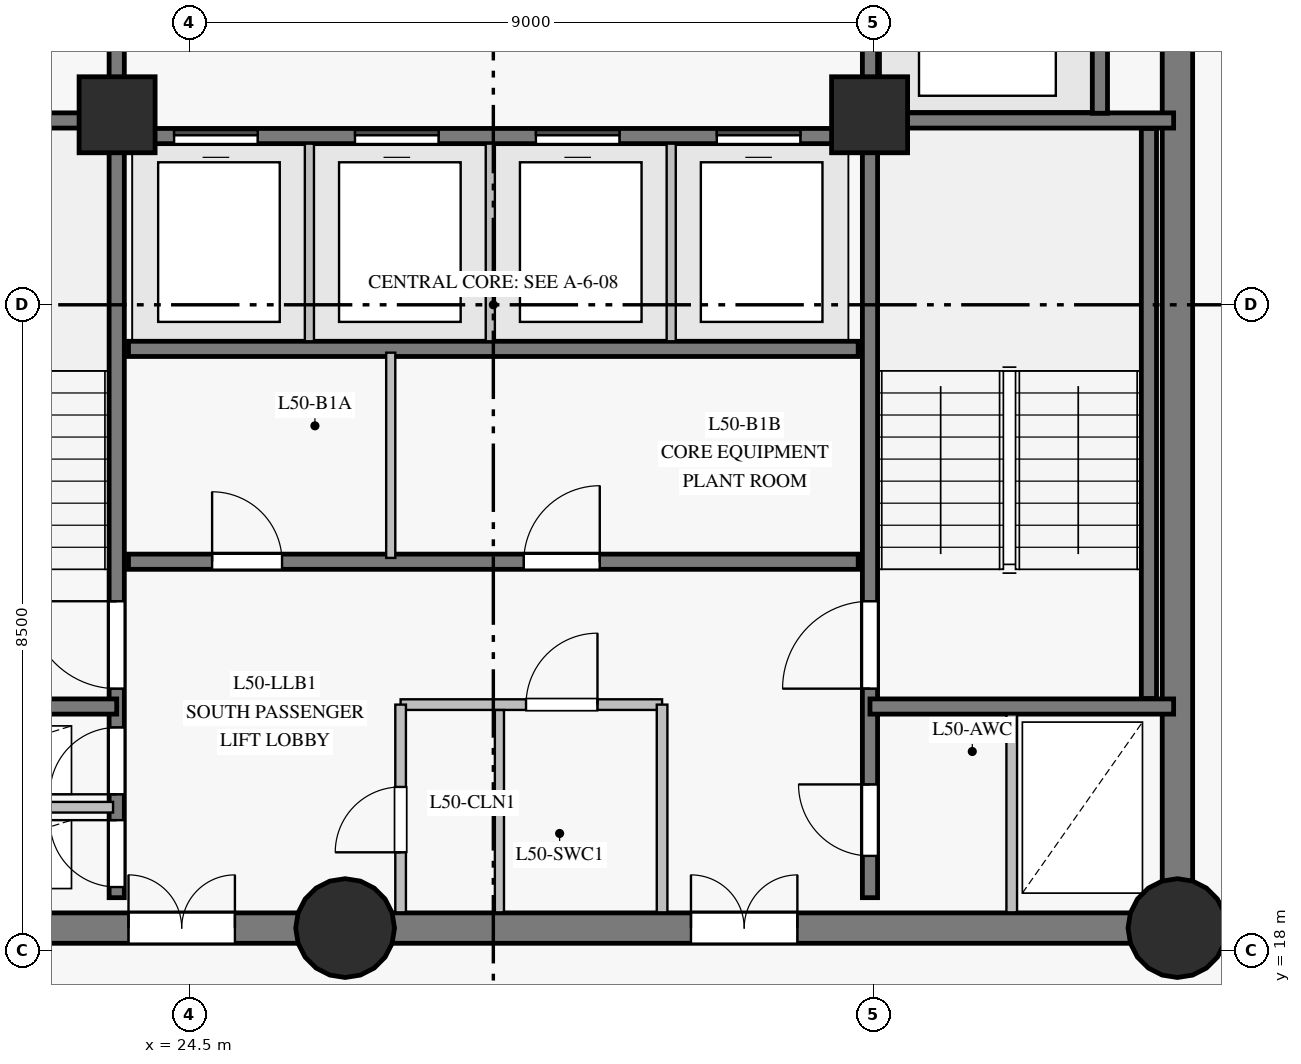
"""IFC4 building model, lengths in metres.
Left out: names, types, materials, properties, quantities, classifications, styles, units other than length and angle.
Written with IfcOpenShell. Run it as: python <this file> out.ifc"""

import sys

from ifc_helpers import new_model, si_unit, direction, frame, frame_2d, origin, origin_with_axes, origin_2d, place, context, subcontext, project, spatial, rectangle, circle, extrude, source, transform, mapped, element, fill, save


model = new_model("IFC4")
c1 = context("Model", 3, precision=1e-05, world=origin(), true_north=direction((0.0, 1.0)))
c2 = subcontext(c1, "Body", "Model", "MODEL_VIEW")
j1 = project(units=[si_unit("LENGTHUNIT", "METRE"), si_unit("PLANEANGLEUNIT", "RADIAN")], contexts=[c1])
p1 = place(None, origin())
s1 = spatial("IfcSite", under=j1, at=p1, CompositionType="ELEMENT")
p2 = place(p1, origin())
s2 = spatial("IfcBuilding", under=s1, at=p2, CompositionType="ELEMENT")
p3 = place(p2, frame((0.0, 0.0, 174.85)))
s3 = spatial("IfcBuildingStorey", under=s2, at=p3, CompositionType="ELEMENT", Elevation=174.85)
p4 = place(p3, frame((19.5, 18.3, 0.0), z_axis=(0.0, 0.0, 1.0), x_axis=(1.0, 0.0, 0.0)))
e1 = element("IfcWall", 1, at=p4, inside=s3, PredefinedType="SHEAR", context=c2, shape_type="SweptSolid", body=[
    extrude(rectangle(XDim=7.05, YDim=0.4, at=frame_2d((3.525, 0.0))), origin(), (0.0, 0.0, 1.0), 2.825),
])
p5 = place(p4, frame((4.2, 0.0, 0.0)))
e2 = element("IfcOpeningElement", 2, at=p5, cuts=e1, PredefinedType="OPENING", context=c2, shape_type="SweptSolid", body=[
    extrude(rectangle(XDim=1.4, YDim=2.2, at=frame_2d((0.7, 1.1))), frame((0.0, 0.21, 0.0), z_axis=(0.0, -1.0, 0.0), x_axis=(1.0, 0.0, 0.0)), (0.0, 0.0, 1.0), 0.42),
])
p6 = place(p3, frame((26.55, 18.3, 0.0), z_axis=(0.0, 0.0, 1.0), x_axis=(1.0, 0.0, 0.0)))
e3 = element("IfcWall", 3, at=p6, inside=s3, PredefinedType="SHEAR", context=c2, shape_type="SweptSolid", body=[
    extrude(rectangle(XDim=10.95, YDim=0.4, at=frame_2d((5.475, 0.0))), origin(), (0.0, 0.0, 1.0), 2.825),
])
p7 = place(p6, frame((4.55, 0.0, 0.0)))
e4 = element("IfcOpeningElement", 4, at=p7, cuts=e3, PredefinedType="OPENING", context=c2, shape_type="SweptSolid", body=[
    extrude(rectangle(XDim=1.4, YDim=2.2, at=frame_2d((0.7, 1.1))), frame((0.0, 0.21, 0.0), z_axis=(0.0, -1.0, 0.0), x_axis=(1.0, 0.0, 0.0)), (0.0, 0.0, 1.0), 0.42),
])
p8 = place(p3, frame((37.5, 18.3, 0.0), z_axis=(0.0, 0.0, 1.0), x_axis=(0.0, 1.0, 0.0)))
e5 = element("IfcWall", 5, at=p8, inside=s3, PredefinedType="SHEAR", context=c2, shape_type="SweptSolid", body=[
    extrude(rectangle(XDim=16.4, YDim=0.4, at=frame_2d((8.2, 0.0))), origin(), (0.0, 0.0, 1.0), 2.825),
])
p9 = place(p8, frame((14.15, 0.0, 0.0)))
e6 = element("IfcOpeningElement", 6, at=p9, cuts=e5, PredefinedType="OPENING", context=c2, shape_type="SweptSolid", body=[
    extrude(rectangle(XDim=1.2, YDim=2.15, at=frame_2d((0.6, 1.075))), frame((0.0, 0.21, 0.0), z_axis=(0.0, -1.0, 0.0), x_axis=(1.0, 0.0, 0.0)), (0.0, 0.0, 1.0), 0.42),
])
m1 = source(origin_with_axes(), c2, "Body", "SweptSolid", [
    extrude(circle(Radius=0.65, at=origin_2d()), origin(), (0.0, 0.0, 1.0), 3.05),
])
for number, where, z_axis, x_axis in (
    (7, (26.55, 18.3, 0.0), (0.0, 0.0, 1.0), (1.0, 0.0, 0.0)),
    (8, (37.5, 18.3, 0.0), (0.0, 0.0, 1.0), (1.0, 0.0, 0.0)),
):
    element("IfcColumn", number, at=place(p3, frame(where, z_axis=z_axis, x_axis=x_axis)), inside=s3, PredefinedType="COLUMN", context=c2, shape_type="MappedRepresentation", body=[
        mapped(m1, transform((0.0, 0.0, 0.0), scale=1.0)),
    ])
m2 = source(origin_with_axes(), c2, "Body", "SweptSolid", [
    extrude(rectangle(XDim=1.0, YDim=1.0, at=origin_2d()), origin(), (0.0, 0.0, 1.0), 3.05),
])
for number, where, z_axis, x_axis in (
    (9, (23.55, 29.0, 0.0), (0.0, 0.0, 1.0), (1.0, 0.0, 0.0)),
    (10, (33.45, 29.0, 0.0), (0.0, 0.0, 1.0), (1.0, 0.0, 0.0)),
):
    element("IfcColumn", number, at=place(p3, frame(where, z_axis=z_axis, x_axis=x_axis)), inside=s3, PredefinedType="COLUMN", context=c2, shape_type="MappedRepresentation", body=[
        mapped(m2, transform((0.0, 0.0, 0.0), scale=1.0)),
    ])
p10 = place(p3, frame((23.545, 18.7, 0.0), z_axis=(0.0, 0.0, 1.0), x_axis=(0.0, 1.0, 0.0)))
e11 = element("IfcWall", 11, at=p10, inside=s3, PredefinedType="SHEAR", context=c2, shape_type="SweptSolid", body=[
    extrude(rectangle(XDim=15.6, YDim=0.2, at=frame_2d((7.8, 0.0))), origin(), (0.0, 0.0, 1.0), 2.825),
])
p11 = place(p10, frame((2.75, 0.0, 0.0)))
e12 = element("IfcOpeningElement", 12, at=p11, cuts=e11, PredefinedType="OPENING", context=c2, shape_type="SweptSolid", body=[
    extrude(rectangle(XDim=1.15, YDim=2.15, at=frame_2d((0.575, 1.075))), frame((0.0, 0.11, 0.0), z_axis=(0.0, -1.0, 0.0), x_axis=(1.0, 0.0, 0.0)), (0.0, 0.0, 1.0), 0.22),
])
p12 = place(p10, frame((0.14, 0.0, 0.0)))
e13 = element("IfcOpeningElement", 13, at=p12, cuts=e11, PredefinedType="OPENING", context=c2, shape_type="SweptSolid", body=[
    extrude(rectangle(XDim=0.88, YDim=2.1, at=frame_2d((0.44, 1.05))), frame((0.0, 0.11, 0.0), z_axis=(0.0, -1.0, 0.0), x_axis=(1.0, 0.0, 0.0)), (0.0, 0.0, 1.0), 0.22),
])
p13 = place(p10, frame((1.36, 0.0, 0.0)))
e14 = element("IfcOpeningElement", 14, at=p13, cuts=e11, PredefinedType="OPENING", context=c2, shape_type="SweptSolid", body=[
    extrude(rectangle(XDim=0.88, YDim=2.1, at=frame_2d((0.44, 1.05))), frame((0.0, 0.11, 0.0), z_axis=(0.0, -1.0, 0.0), x_axis=(1.0, 0.0, 0.0)), (0.0, 0.0, 1.0), 0.22),
])
p14 = place(p10, frame((12.1, 0.0, 0.0)))
e15 = element("IfcOpeningElement", 15, at=p14, cuts=e11, PredefinedType="OPENING", context=c2, shape_type="SweptSolid", body=[
    extrude(rectangle(XDim=1.12, YDim=2.15, at=frame_2d((0.56, 1.075))), frame((0.0, 0.11, 0.0), z_axis=(0.0, -1.0, 0.0), x_axis=(1.0, 0.0, 0.0)), (0.0, 0.0, 1.0), 0.22),
])
p15 = place(p10, frame((14.05, 0.0, 0.0)))
e16 = element("IfcOpeningElement", 16, at=p15, cuts=e11, PredefinedType="OPENING", context=c2, shape_type="SweptSolid", body=[
    extrude(rectangle(XDim=1.12, YDim=2.15, at=frame_2d((0.56, 1.075))), frame((0.0, 0.11, 0.0), z_axis=(0.0, -1.0, 0.0), x_axis=(1.0, 0.0, 0.0)), (0.0, 0.0, 1.0), 0.22),
])
p16 = place(p3, frame((33.455, 18.7, 0.0), z_axis=(0.0, 0.0, 1.0), x_axis=(0.0, 1.0, 0.0)))
e17 = element("IfcWall", 17, at=p16, inside=s3, PredefinedType="SHEAR", context=c2, shape_type="SweptSolid", body=[
    extrude(rectangle(XDim=15.6, YDim=0.2, at=frame_2d((7.8, 0.0))), origin(), (0.0, 0.0, 1.0), 2.825),
])
p17 = place(p16, frame((2.75, 0.0, 0.0)))
e18 = element("IfcOpeningElement", 18, at=p17, cuts=e17, PredefinedType="OPENING", context=c2, shape_type="SweptSolid", body=[
    extrude(rectangle(XDim=1.15, YDim=2.15, at=frame_2d((0.575, 1.075))), frame((0.0, 0.11, 0.0), z_axis=(0.0, -1.0, 0.0), x_axis=(1.0, 0.0, 0.0)), (0.0, 0.0, 1.0), 0.22),
])
p18 = place(p16, frame((0.55, 0.0, 0.0)))
e19 = element("IfcOpeningElement", 19, at=p18, cuts=e17, PredefinedType="OPENING", context=c2, shape_type="SweptSolid", body=[
    extrude(rectangle(XDim=0.94, YDim=2.1, at=frame_2d((0.47, 1.05))), frame((0.0, 0.11, 0.0), z_axis=(0.0, -1.0, 0.0), x_axis=(1.0, 0.0, 0.0)), (0.0, 0.0, 1.0), 0.22),
])
p19 = place(p3, frame((23.7, 23.12, 0.0), z_axis=(0.0, 0.0, 1.0), x_axis=(1.0, 0.0, 0.0)))
e20 = element("IfcWall", 20, at=p19, inside=s3, PredefinedType="SHEAR", context=c2, shape_type="SweptSolid", body=[
    extrude(rectangle(XDim=9.6, YDim=0.2, at=frame_2d((4.8, 0.0))), origin(), (0.0, 0.0, 1.0), 2.825),
])
p20 = place(p19, frame((1.1, 0.0, 0.0)))
e21 = element("IfcOpeningElement", 21, at=p20, cuts=e20, PredefinedType="OPENING", context=c2, shape_type="SweptSolid", body=[
    extrude(rectangle(XDim=0.92, YDim=2.1, at=frame_2d((0.46, 1.05))), frame((0.0, 0.11, 0.0), z_axis=(0.0, -1.0, 0.0), x_axis=(1.0, 0.0, 0.0)), (0.0, 0.0, 1.0), 0.22),
])
p21 = place(p19, frame((5.2, 0.0, 0.0)))
e22 = element("IfcOpeningElement", 22, at=p21, cuts=e20, PredefinedType="OPENING", context=c2, shape_type="SweptSolid", body=[
    extrude(rectangle(XDim=1.0, YDim=2.15, at=frame_2d((0.5, 1.075))), frame((0.0, 0.11, 0.0), z_axis=(0.0, -1.0, 0.0), x_axis=(1.0, 0.0, 0.0)), (0.0, 0.0, 1.0), 0.22),
])
p22 = place(p3, frame((23.7, 25.92, 0.0), z_axis=(0.0, 0.0, 1.0), x_axis=(1.0, 0.0, 0.0)))
e23 = element("IfcWall", 23, at=p22, inside=s3, PredefinedType="SHEAR", context=c2, shape_type="SweptSolid", body=[
    extrude(rectangle(XDim=9.6, YDim=0.2, at=frame_2d((4.8, 0.0))), origin(), (0.0, 0.0, 1.0), 2.825),
])
p23 = place(p3, frame((23.7, 28.72, 0.0), z_axis=(0.0, 0.0, 1.0), x_axis=(1.0, 0.0, 0.0)))
e24 = element("IfcWall", 24, at=p23, inside=s3, PredefinedType="SHEAR", context=c2, shape_type="SweptSolid", body=[
    extrude(rectangle(XDim=9.6, YDim=0.2, at=frame_2d((4.8, 0.0))), origin(), (0.0, 0.0, 1.0), 2.825),
])
p24 = place(p23, frame((0.6, 0.0, 0.0)))
e25 = element("IfcOpeningElement", 25, at=p24, cuts=e24, PredefinedType="OPENING", context=c2, shape_type="SweptSolid", body=[
    extrude(rectangle(XDim=1.1, YDim=2.15, at=frame_2d((0.55, 1.075))), frame((0.0, 0.11, 0.0), z_axis=(0.0, -1.0, 0.0), x_axis=(1.0, 0.0, 0.0)), (0.0, 0.0, 1.0), 0.22),
])
p25 = place(p23, frame((2.98, 0.0, 0.0)))
e26 = element("IfcOpeningElement", 26, at=p25, cuts=e24, PredefinedType="OPENING", context=c2, shape_type="SweptSolid", body=[
    extrude(rectangle(XDim=1.1, YDim=2.15, at=frame_2d((0.55, 1.075))), frame((0.0, 0.11, 0.0), z_axis=(0.0, -1.0, 0.0), x_axis=(1.0, 0.0, 0.0)), (0.0, 0.0, 1.0), 0.22),
])
p26 = place(p23, frame((5.36, 0.0, 0.0)))
e27 = element("IfcOpeningElement", 27, at=p26, cuts=e24, PredefinedType="OPENING", context=c2, shape_type="SweptSolid", body=[
    extrude(rectangle(XDim=1.1, YDim=2.15, at=frame_2d((0.55, 1.075))), frame((0.0, 0.11, 0.0), z_axis=(0.0, -1.0, 0.0), x_axis=(1.0, 0.0, 0.0)), (0.0, 0.0, 1.0), 0.22),
])
p27 = place(p23, frame((7.74, 0.0, 0.0)))
e28 = element("IfcOpeningElement", 28, at=p27, cuts=e24, PredefinedType="OPENING", context=c2, shape_type="SweptSolid", body=[
    extrude(rectangle(XDim=1.1, YDim=2.15, at=frame_2d((0.55, 1.075))), frame((0.0, 0.11, 0.0), z_axis=(0.0, -1.0, 0.0), x_axis=(1.0, 0.0, 0.0)), (0.0, 0.0, 1.0), 0.22),
])
p28 = place(p3, frame((37.125, 21.32, 0.0), z_axis=(0.0, 0.0, 1.0), x_axis=(0.0, 1.0, 0.0)))
e29 = element("IfcWall", 29, at=p28, inside=s3, PredefinedType="SHEAR", context=c2, shape_type="SweptSolid", body=[
    extrude(rectangle(XDim=7.5, YDim=0.2, at=frame_2d((3.75, 0.0))), origin(), (0.0, 0.0, 1.0), 2.825),
])
for number, where, z_axis, x_axis in (
    (30, (33.455, 21.215, 0.0), (0.0, 0.0, 1.0), (1.0, 0.0, 0.0)),
    (31, (33.455, 28.925, 0.0), (0.0, 0.0, 1.0), (1.0, 0.0, 0.0)),
    (32, (19.55, 21.215, 0.0), (0.0, 0.0, 1.0), (1.0, 0.0, 0.0)),
    (33, (19.55, 28.925, 0.0), (0.0, 0.0, 1.0), (1.0, 0.0, 0.0)),
):
    element("IfcWall", number, at=place(p3, frame(where, z_axis=z_axis, x_axis=x_axis)), inside=s3, PredefinedType="SHEAR", context=c2, shape_type="SweptSolid", body=[
        extrude(rectangle(XDim=3.995, YDim=0.2, at=frame_2d((1.998, 0.0))), origin(), (0.0, 0.0, 1.0), 2.825),
    ])
p29 = place(p3, frame((36.48, 29.02, 0.0), z_axis=(0.0, 0.0, 1.0), x_axis=(0.0, 1.0, 0.0)))
e34 = element("IfcWall", 34, at=p29, inside=s3, PredefinedType="SHEAR", context=c2, shape_type="SweptSolid", body=[
    extrude(rectangle(XDim=2.86, YDim=0.2, at=frame_2d((1.43, 0.0))), origin(), (0.0, 0.0, 1.0), 2.825),
])
p30 = place(p3, frame((19.707, 19.89, 0.0), z_axis=(0.0, 0.0, 1.0), x_axis=(1.0, 0.0, 0.0)))
e35 = element("IfcWall", 35, at=p30, inside=s3, PredefinedType="PARTITIONING", context=c2, shape_type="SweptSolid", body=[
    extrude(rectangle(XDim=3.79, YDim=0.14, at=frame_2d((1.895, 0.0))), origin(), (0.0, 0.0, 1.0), 2.825),
])
p31 = place(p3, frame((27.28, 21.24, 0.0), z_axis=(0.0, 0.0, 1.0), x_axis=(1.0, 0.0, 0.0)))
e36 = element("IfcWall", 36, at=p31, inside=s3, PredefinedType="PARTITIONING", context=c2, shape_type="SweptSolid", body=[
    extrude(rectangle(XDim=3.44, YDim=0.14, at=frame_2d((1.72, 0.0))), origin(), (0.0, 0.0, 1.0), 2.825),
])
p32 = place(p31, frame((1.65, 0.0, 0.0)))
e37 = element("IfcOpeningElement", 37, at=p32, cuts=e36, PredefinedType="OPENING", context=c2, shape_type="SweptSolid", body=[
    extrude(rectangle(XDim=0.94, YDim=2.1, at=frame_2d((0.47, 1.05))), frame((0.0, 0.08, 0.0), z_axis=(0.0, -1.0, 0.0), x_axis=(1.0, 0.0, 0.0)), (0.0, 0.0, 1.0), 0.16),
])
p33 = place(p3, frame((27.15, 23.17, 0.0), z_axis=(0.0, 0.0, 1.0), x_axis=(0.0, 1.0, 0.0)))
e38 = element("IfcWall", 38, at=p33, inside=s3, PredefinedType="PARTITIONING", context=c2, shape_type="SweptSolid", body=[
    extrude(rectangle(XDim=2.7, YDim=0.12, at=frame_2d((1.35, 0.0))), origin(), (0.0, 0.0, 1.0), 2.825),
])
p34 = place(p3, frame((27.28, 18.507, 0.0), z_axis=(0.0, 0.0, 1.0), x_axis=(0.0, 1.0, 0.0)))
e39 = element("IfcWall", 39, at=p34, inside=s3, PredefinedType="PARTITIONING", context=c2, shape_type="SweptSolid", body=[
    extrude(rectangle(XDim=2.733, YDim=0.14, at=frame_2d((1.366, 0.0))), origin(), (0.0, 0.0, 1.0), 2.825),
])
p35 = place(p34, frame((0.79, 0.0, 0.0)))
e40 = element("IfcOpeningElement", 40, at=p35, cuts=e39, PredefinedType="OPENING", context=c2, shape_type="SweptSolid", body=[
    extrude(rectangle(XDim=0.86, YDim=2.1, at=frame_2d((0.43, 1.05))), frame((0.0, 0.08, 0.0), z_axis=(0.0, -1.0, 0.0), x_axis=(1.0, 0.0, 0.0)), (0.0, 0.0, 1.0), 0.16),
])
p36 = place(p3, frame((30.72, 18.507, 0.0), z_axis=(0.0, 0.0, 1.0), x_axis=(0.0, 1.0, 0.0)))
e41 = element("IfcWall", 41, at=p36, inside=s3, PredefinedType="PARTITIONING", context=c2, shape_type="SweptSolid", body=[
    extrude(rectangle(XDim=2.733, YDim=0.14, at=frame_2d((1.366, 0.0))), origin(), (0.0, 0.0, 1.0), 2.825),
])
for number, where, z_axis, x_axis in (
    (42, (26.08, 26.02, 0.0), (0.0, 0.0, 1.0), (0.0, 1.0, 0.0)),
    (43, (28.46, 26.02, 0.0), (0.0, 0.0, 1.0), (0.0, 1.0, 0.0)),
    (44, (30.84, 26.02, 0.0), (0.0, 0.0, 1.0), (0.0, 1.0, 0.0)),
):
    element("IfcWall", number, at=place(p3, frame(where, z_axis=z_axis, x_axis=x_axis)), inside=s3, PredefinedType="PARTITIONING", context=c2, shape_type="SweptSolid", body=[
        extrude(rectangle(XDim=2.6, YDim=0.12, at=frame_2d((1.3, 0.0))), origin(), (0.0, 0.0, 1.0), 2.825),
    ])
p37 = place(p3, frame((28.58, 18.507, 0.0), z_axis=(0.0, 0.0, 1.0), x_axis=(0.0, 1.0, 0.0)))
e45 = element("IfcWall", 45, at=p37, inside=s3, PredefinedType="PARTITIONING", context=c2, shape_type="SweptSolid", body=[
    extrude(rectangle(XDim=2.662, YDim=0.12, at=frame_2d((1.331, 0.0))), origin(), (0.0, 0.0, 1.0), 2.825),
])
p38 = place(p3, frame((35.32, 18.507, 0.0), z_axis=(0.0, 0.0, 1.0), x_axis=(0.0, 1.0, 0.0)))
e46 = element("IfcWall", 46, at=p38, inside=s3, PredefinedType="PARTITIONING", context=c2, shape_type="SweptSolid", body=[
    extrude(rectangle(XDim=2.604, YDim=0.14, at=frame_2d((1.302, 0.0))), origin(), (0.0, 0.0, 1.0), 2.825),
])
m3 = source(origin_with_axes(), c2, "Body", "SweptSolid", [
    extrude(rectangle(XDim=1.15, YDim=2.15, at=frame_2d((0.575, 1.075))), frame((0.0, 0.025, 0.0), z_axis=(0.0, -1.0, 0.0), x_axis=(1.0, 0.0, 0.0)), (0.0, 0.0, 1.0), 0.05),
])
p39 = place(p11, origin())
e47 = element("IfcDoor", 47, at=p39, inside=s3, OperationType="SINGLE_SWING_RIGHT", PredefinedType="DOOR", context=c2, shape_type="MappedRepresentation", body=[
    mapped(m3, transform((0.0, 0.0, 0.0), scale=1.0)),
])
fill(e12, e47)
p40 = place(p17, origin())
e48 = element("IfcDoor", 48, at=p40, inside=s3, OperationType="SINGLE_SWING_LEFT", PredefinedType="DOOR", context=c2, shape_type="MappedRepresentation", body=[
    mapped(m3, transform((0.0, 0.0, 0.0), scale=1.0)),
])
fill(e18, e48)
m4 = source(origin_with_axes(), c2, "Body", "SweptSolid", [
    extrude(rectangle(XDim=0.88, YDim=2.1, at=frame_2d((0.44, 1.05))), frame((0.0, 0.025, 0.0), z_axis=(0.0, -1.0, 0.0), x_axis=(1.0, 0.0, 0.0)), (0.0, 0.0, 1.0), 0.05),
])
p41 = place(p12, origin())
e49 = element("IfcDoor", 49, at=p41, inside=s3, OperationType="SINGLE_SWING_RIGHT", PredefinedType="DOOR", context=c2, shape_type="MappedRepresentation", body=[
    mapped(m4, transform((0.0, 0.0, 0.0), scale=1.0)),
])
fill(e13, e49)
p42 = place(p13, origin())
e50 = element("IfcDoor", 50, at=p42, inside=s3, OperationType="SINGLE_SWING_LEFT", PredefinedType="DOOR", context=c2, shape_type="MappedRepresentation", body=[
    mapped(m4, transform((0.0, 0.0, 0.0), scale=1.0)),
])
fill(e14, e50)
m5 = source(origin_with_axes(), c2, "Body", "SweptSolid", [
    extrude(rectangle(XDim=1.4, YDim=2.2, at=frame_2d((0.7, 1.1))), frame((0.0, 0.025, 0.0), z_axis=(0.0, -1.0, 0.0), x_axis=(1.0, 0.0, 0.0)), (0.0, 0.0, 1.0), 0.05),
])
p43 = place(p5, origin())
e51 = element("IfcDoor", 51, at=p43, inside=s3, OperationType="DOUBLE_DOOR_SINGLE_SWING", PredefinedType="DOOR", context=c2, shape_type="MappedRepresentation", body=[
    mapped(m5, transform((0.0, 0.0, 0.0), scale=1.0)),
])
fill(e2, e51)
p44 = place(p7, origin())
e52 = element("IfcDoor", 52, at=p44, inside=s3, OperationType="DOUBLE_DOOR_SINGLE_SWING", PredefinedType="DOOR", context=c2, shape_type="MappedRepresentation", body=[
    mapped(m5, transform((0.0, 0.0, 0.0), scale=1.0)),
])
fill(e4, e52)
m6 = source(origin_with_axes(), c2, "Body", "SweptSolid", [
    extrude(rectangle(XDim=0.94, YDim=2.1, at=frame_2d((0.47, 1.05))), frame((0.0, 0.025, 0.0), z_axis=(0.0, -1.0, 0.0), x_axis=(1.0, 0.0, 0.0)), (0.0, 0.0, 1.0), 0.05),
])
p45 = place(p18, origin())
e53 = element("IfcDoor", 53, at=p45, inside=s3, OperationType="SINGLE_SWING_RIGHT", PredefinedType="DOOR", context=c2, shape_type="MappedRepresentation", body=[
    mapped(m6, transform((0.0, 0.0, 0.0), scale=1.0)),
])
fill(e19, e53)
m7 = source(origin_with_axes(), c2, "Body", "SweptSolid", [
    extrude(rectangle(XDim=0.86, YDim=2.1, at=frame_2d((0.43, 1.05))), frame((0.0, 0.025, 0.0), z_axis=(0.0, -1.0, 0.0), x_axis=(1.0, 0.0, 0.0)), (0.0, 0.0, 1.0), 0.05),
])
p46 = place(p35, origin())
e54 = element("IfcDoor", 54, at=p46, inside=s3, OperationType="SINGLE_SWING_LEFT", PredefinedType="DOOR", context=c2, shape_type="MappedRepresentation", body=[
    mapped(m7, transform((0.0, 0.0, 0.0), scale=1.0)),
])
fill(e40, e54)
p47 = place(p32, origin())
e55 = element("IfcDoor", 55, at=p47, inside=s3, OperationType="SINGLE_SWING_RIGHT", PredefinedType="DOOR", context=c2, shape_type="MappedRepresentation", body=[
    mapped(m6, transform((0.0, 0.0, 0.0), scale=1.0)),
])
fill(e37, e55)
m8 = source(origin_with_axes(), c2, "Body", "SweptSolid", [
    extrude(rectangle(XDim=0.92, YDim=2.1, at=frame_2d((0.46, 1.05))), frame((0.0, 0.025, 0.0), z_axis=(0.0, -1.0, 0.0), x_axis=(1.0, 0.0, 0.0)), (0.0, 0.0, 1.0), 0.05),
])
p48 = place(p20, origin())
e56 = element("IfcDoor", 56, at=p48, inside=s3, OperationType="SINGLE_SWING_LEFT", PredefinedType="DOOR", context=c2, shape_type="MappedRepresentation", body=[
    mapped(m8, transform((0.0, 0.0, 0.0), scale=1.0)),
])
fill(e21, e56)
m9 = source(origin_with_axes(), c2, "Body", "SweptSolid", [
    extrude(rectangle(XDim=1.0, YDim=2.15, at=frame_2d((0.5, 1.075))), frame((0.0, 0.025, 0.0), z_axis=(0.0, -1.0, 0.0), x_axis=(1.0, 0.0, 0.0)), (0.0, 0.0, 1.0), 0.05),
])
p49 = place(p21, origin())
e57 = element("IfcDoor", 57, at=p49, inside=s3, OperationType="SINGLE_SWING_RIGHT", PredefinedType="DOOR", context=c2, shape_type="MappedRepresentation", body=[
    mapped(m9, transform((0.0, 0.0, 0.0), scale=1.0)),
])
fill(e22, e57)
m10 = source(origin_with_axes(), c2, "Body", "SweptSolid", [
    extrude(rectangle(XDim=1.1, YDim=2.15, at=frame_2d((0.55, 1.075))), frame((0.0, 0.025, 0.0), z_axis=(0.0, -1.0, 0.0), x_axis=(1.0, 0.0, 0.0)), (0.0, 0.0, 1.0), 0.05),
])
p50 = place(p24, origin())
e58 = element("IfcDoor", 58, at=p50, inside=s3, OperationType="SLIDING_TO_LEFT", PredefinedType="DOOR", context=c2, shape_type="MappedRepresentation", body=[
    mapped(m10, transform((0.0, 0.0, 0.0), scale=1.0)),
])
fill(e25, e58)
p51 = place(p25, origin())
e59 = element("IfcDoor", 59, at=p51, inside=s3, OperationType="SLIDING_TO_RIGHT", PredefinedType="DOOR", context=c2, shape_type="MappedRepresentation", body=[
    mapped(m10, transform((0.0, 0.0, 0.0), scale=1.0)),
])
fill(e26, e59)
p52 = place(p26, origin())
e60 = element("IfcDoor", 60, at=p52, inside=s3, OperationType="SLIDING_TO_LEFT", PredefinedType="DOOR", context=c2, shape_type="MappedRepresentation", body=[
    mapped(m10, transform((0.0, 0.0, 0.0), scale=1.0)),
])
fill(e27, e60)
p53 = place(p27, origin())
e61 = element("IfcDoor", 61, at=p53, inside=s3, OperationType="SLIDING_TO_RIGHT", PredefinedType="DOOR", context=c2, shape_type="MappedRepresentation", body=[
    mapped(m10, transform((0.0, 0.0, 0.0), scale=1.0)),
])
fill(e28, e61)
save(model, sys.argv[1])
